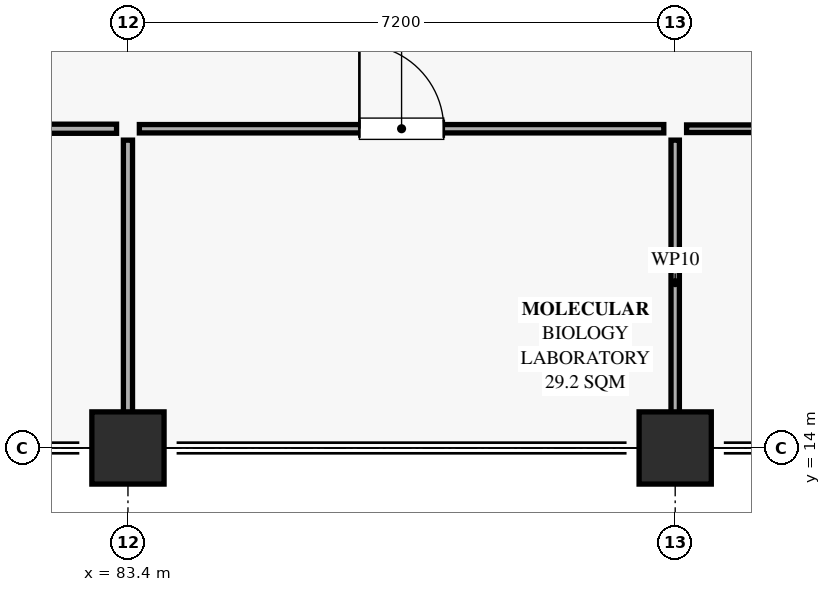
"""IFC4 building model, lengths in metres.
Left out: names, types, materials, properties, quantities, classifications, styles, units other than length and angle.
Written with IfcOpenShell. Run it as: python <this file> out.ifc"""

import sys

from ifc_helpers import new_model, si_unit, direction, frame, frame_2d, origin, origin_2d, place, context, subcontext, project, spatial, rectangle, extrude, element, fill, save


model = new_model("IFC4")
c1 = context("Model", 3, precision=1e-05, world=origin(), true_north=direction((0.0, 1.0)))
c2 = subcontext(c1, "Body", "Model", "MODEL_VIEW")
j1 = project(units=[si_unit("LENGTHUNIT", "METRE"), si_unit("PLANEANGLEUNIT", "RADIAN")], contexts=[c1])
p1 = place(None, origin())
s1 = spatial("IfcSite", under=j1, at=p1, CompositionType="ELEMENT")
p2 = place(p1, origin())
s2 = spatial("IfcBuilding", under=s1, at=p2, CompositionType="ELEMENT")
p3 = place(p2, frame((0.0, 0.0, 5.4)))
s3 = spatial("IfcBuildingStorey", under=s2, at=p3, CompositionType="ELEMENT", Elevation=5.4)
for number, where, z_axis, x_axis in (
    (1, (83.4, 14.0, 0.0), (0.0, 0.0, 1.0), (1.0, 0.0, 0.0)),
    (2, (90.6, 14.0, 0.0), (0.0, 0.0, 1.0), (1.0, 0.0, 0.0)),
):
    element("IfcColumn", number, at=place(p3, frame(where, z_axis=z_axis, x_axis=x_axis)), inside=s3, PredefinedType="COLUMN", context=c2, shape_type="SweptSolid", body=[
        extrude(rectangle(XDim=0.95, YDim=0.95, at=origin_2d()), origin(), (0.0, 0.0, 1.0), 5.04),
    ])
p4 = place(p3, frame((54.95, 18.2, 0.0), z_axis=(0.0, 0.0, 1.0), x_axis=(1.0, 0.0, 0.0)))
e3 = element("IfcWall", 3, at=p4, inside=s3, PredefinedType="PARTITIONING", context=c2, shape_type="SweptSolid", body=[
    extrude(rectangle(XDim=28.3, YDim=0.12, at=frame_2d((14.15, 0.0))), origin(), (0.0, 0.0, 1.0), 3.52),
])
p5 = place(p4, frame((2.695, 0.0, 0.0)))
e4 = element("IfcOpeningElement", 4, at=p5, cuts=e3, PredefinedType="OPENING", context=c2, shape_type="SweptSolid", body=[
    extrude(rectangle(XDim=1.11, YDim=2.1, at=frame_2d((0.555, 1.05))), frame((0.0, 0.07, 0.0), z_axis=(0.0, -1.0, 0.0), x_axis=(1.0, 0.0, 0.0)), (0.0, 0.0, 1.0), 0.14),
])
p6 = place(p3, frame((83.4, 18.05, 0.0), z_axis=(0.0, 0.0, 1.0), x_axis=(0.0, -1.0, 0.0)))
e5 = element("IfcWall", 5, at=p6, inside=s3, PredefinedType="PARTITIONING", context=c2, shape_type="SweptSolid", body=[
    extrude(rectangle(XDim=3.75, YDim=0.12, at=frame_2d((1.875, 0.0))), origin(), (0.0, 0.0, 1.0), 3.52),
])
p7 = place(p3, frame((83.55, 18.2, 0.0), z_axis=(0.0, 0.0, 1.0), x_axis=(1.0, 0.0, 0.0)))
e6 = element("IfcWall", 6, at=p7, inside=s3, PredefinedType="PARTITIONING", context=c2, shape_type="SweptSolid", body=[
    extrude(rectangle(XDim=6.9, YDim=0.11, at=frame_2d((3.45, 0.0))), origin(), (0.0, 0.0, 1.0), 3.52),
])
p8 = place(p7, frame((2.895, 0.0, 0.0)))
e7 = element("IfcOpeningElement", 7, at=p8, cuts=e6, PredefinedType="OPENING", context=c2, shape_type="SweptSolid", body=[
    extrude(rectangle(XDim=1.11, YDim=2.16, at=frame_2d((0.555, 1.08))), frame((0.0, 0.065, 0.0), z_axis=(0.0, -1.0, 0.0), x_axis=(1.0, 0.0, 0.0)), (0.0, 0.0, 1.0), 0.13),
])
p9 = place(p3, frame((90.6, 18.05, 0.0), z_axis=(0.0, 0.0, 1.0), x_axis=(0.0, -1.0, 0.0)))
e8 = element("IfcWall", 8, at=p9, inside=s3, PredefinedType="PARTITIONING", context=c2, shape_type="SweptSolid", body=[
    extrude(rectangle(XDim=3.75, YDim=0.11, at=frame_2d((1.875, 0.0))), origin(), (0.0, 0.0, 1.0), 3.52),
])
p10 = place(p3, frame((90.75, 18.2, 0.0), z_axis=(0.0, 0.0, 1.0), x_axis=(1.0, 0.0, 0.0)))
e9 = element("IfcWall", 9, at=p10, inside=s3, PredefinedType="PARTITIONING", context=c2, shape_type="SweptSolid", body=[
    extrude(rectangle(XDim=28.3, YDim=0.1, at=frame_2d((14.15, 0.0))), origin(), (0.0, 0.0, 1.0), 3.52),
])
p11 = place(p10, frame((24.495, 0.0, 0.0)))
e10 = element("IfcOpeningElement", 10, at=p11, cuts=e9, PredefinedType="OPENING", context=c2, shape_type="SweptSolid", body=[
    extrude(rectangle(XDim=1.11, YDim=2.22, at=frame_2d((0.555, 1.11))), frame((0.0, 0.06, 0.0), z_axis=(0.0, -1.0, 0.0), x_axis=(1.0, 0.0, 0.0)), (0.0, 0.0, 1.0), 0.12),
])
p12 = place(p8, origin())
e11 = element("IfcDoor", 11, at=p12, inside=s3, OperationType="SINGLE_SWING_LEFT", PredefinedType="DOOR", context=c2, shape_type="SweptSolid", body=[
    extrude(rectangle(XDim=1.11, YDim=2.16, at=frame_2d((0.555, 1.08))), frame((0.0, 0.025, 0.0), z_axis=(0.0, -1.0, 0.0), x_axis=(1.0, 0.0, 0.0)), (0.0, 0.0, 1.0), 0.05),
])
fill(e7, e11)
save(model, sys.argv[1])
